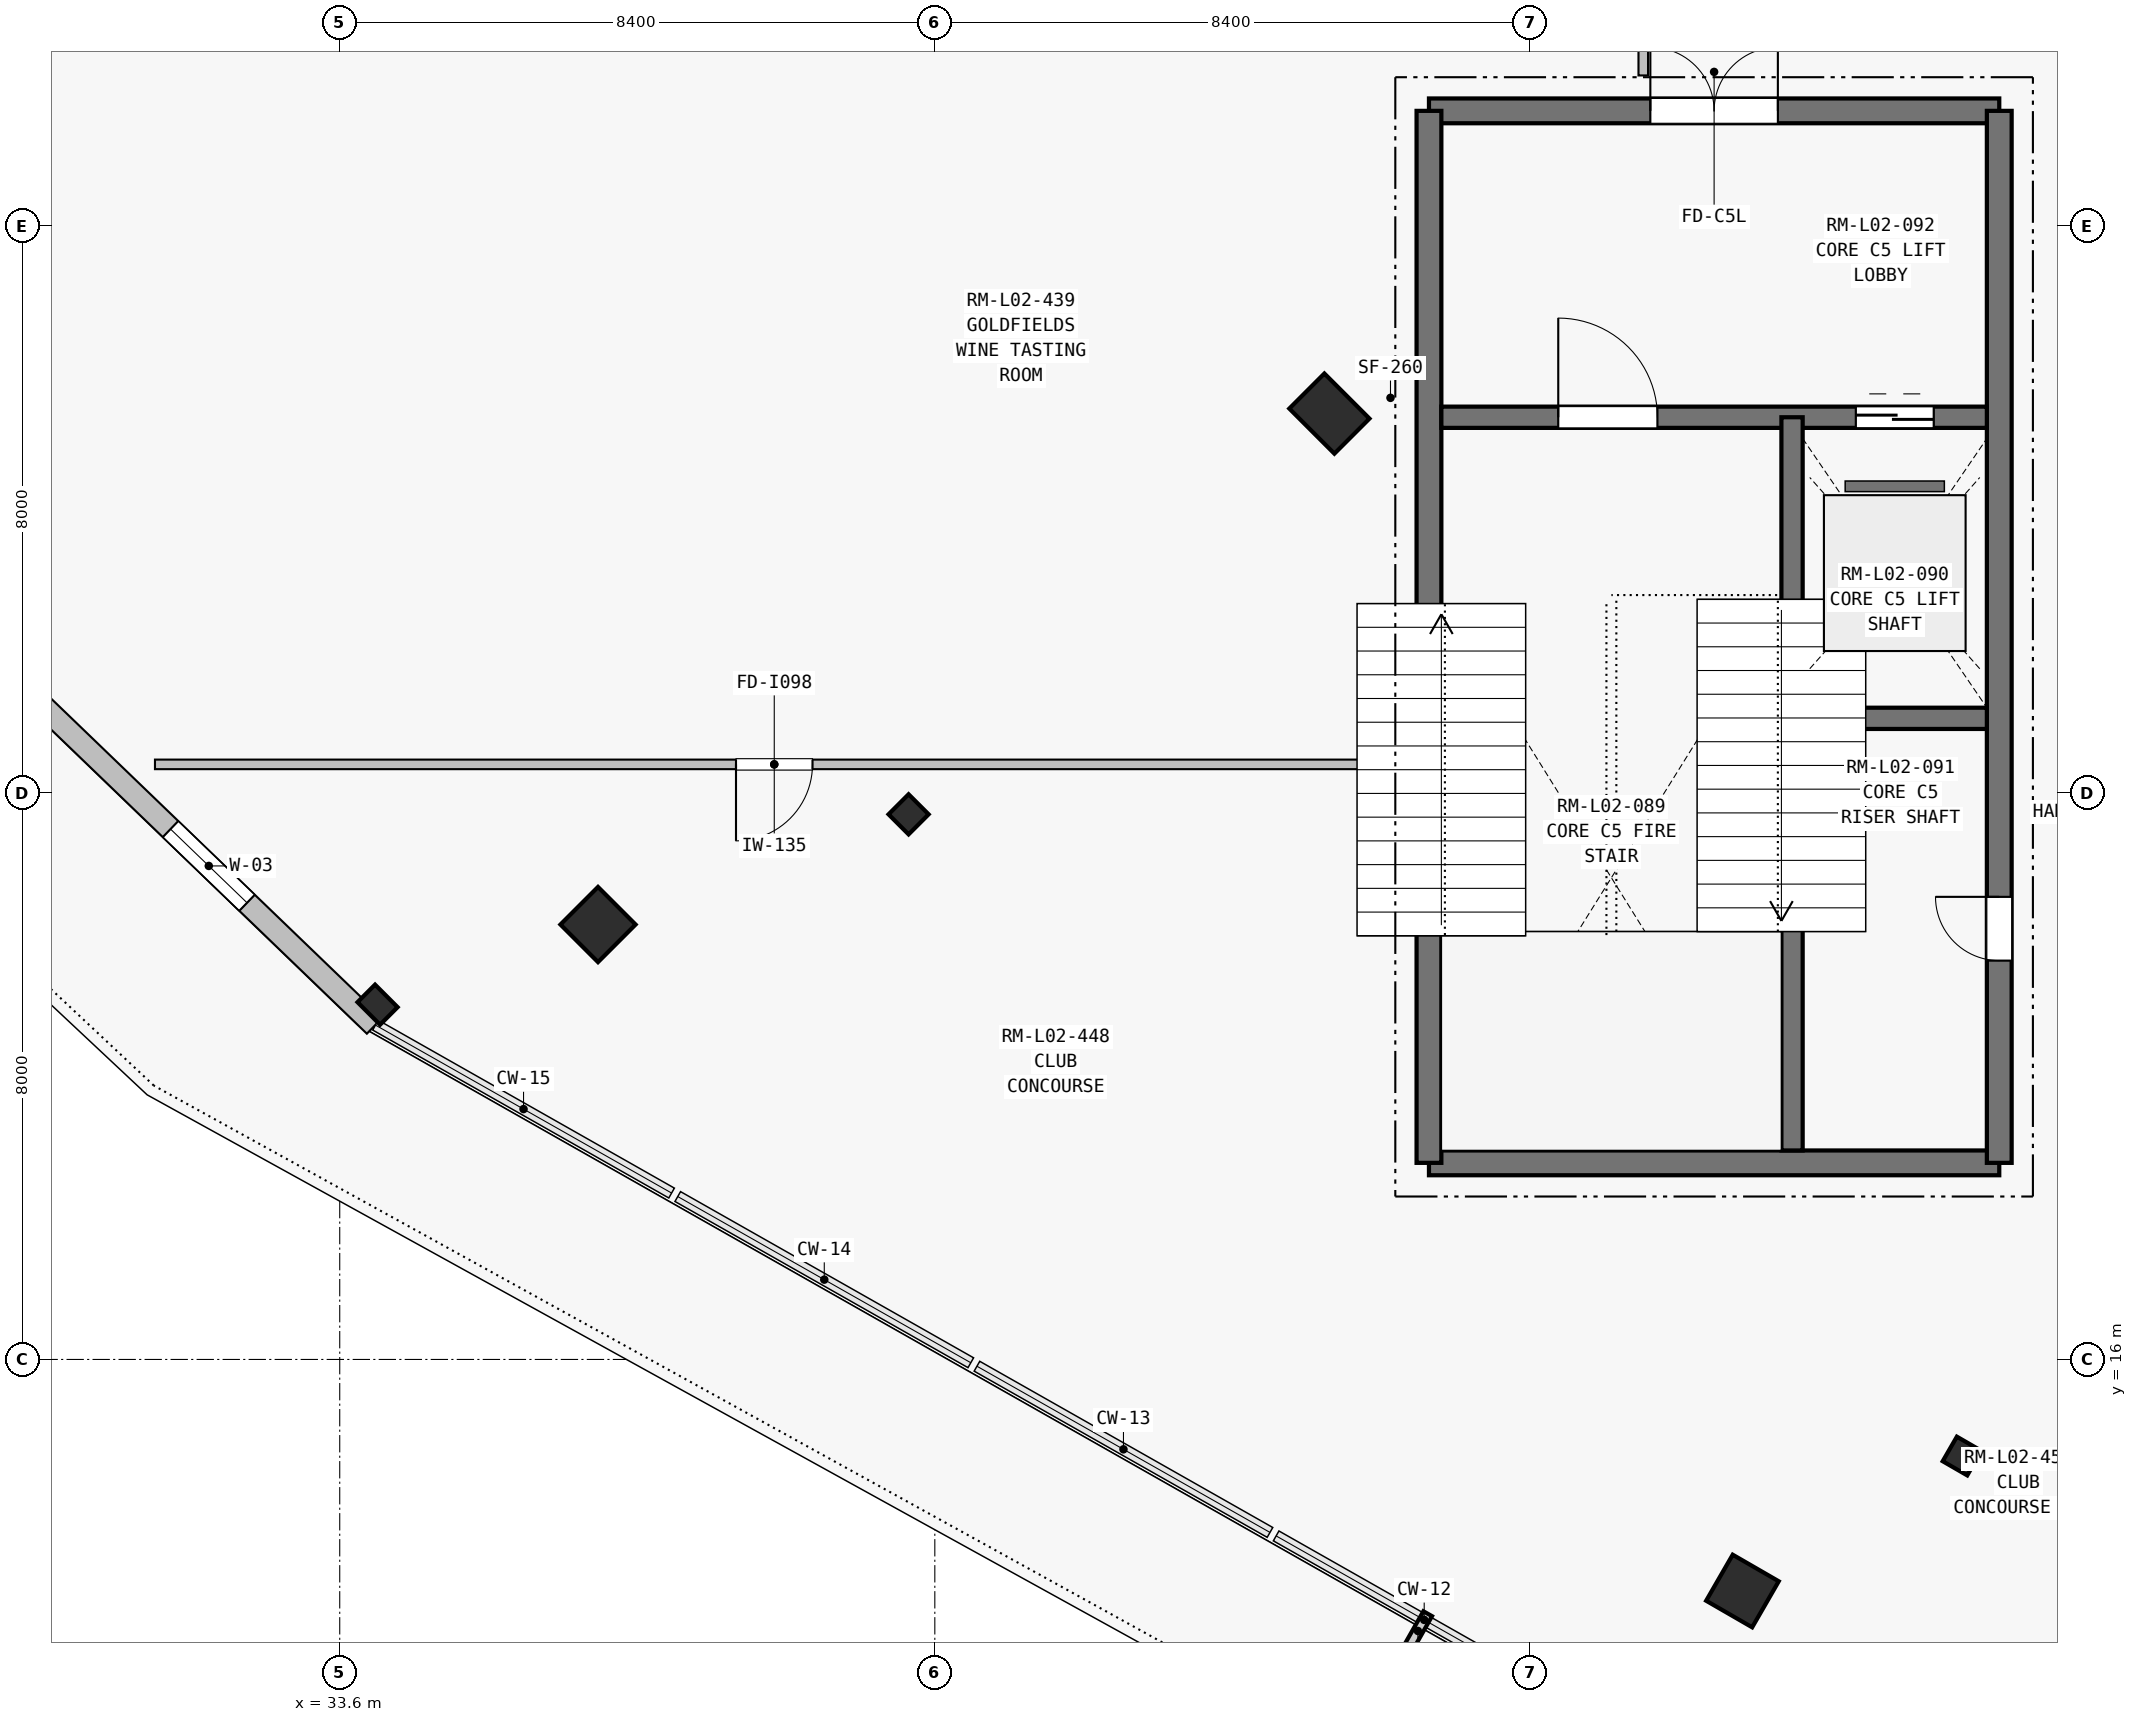
"""IFC4 building model, lengths in metres.
Left out: names, types, materials, properties, quantities, classifications, styles, units other than length and angle.
Written with IfcOpenShell. Run it as: python <this file> out.ifc"""

import sys

from ifc_helpers import new_model, si_unit, direction, frame, frame_2d, origin, origin_2d, place, context, subcontext, project, spatial, rectangle, i_section, extrude, element, fill, save


model = new_model("IFC4")
c1 = context("Model", 3, precision=1e-05, world=origin(), true_north=direction((0.0, 1.0)))
c2 = subcontext(c1, "Body", "Model", "MODEL_VIEW")
j1 = project(units=[si_unit("LENGTHUNIT", "METRE"), si_unit("PLANEANGLEUNIT", "RADIAN")], contexts=[c1])
p1 = place(None, origin())
s1 = spatial("IfcSite", under=j1, at=p1, CompositionType="ELEMENT")
p2 = place(p1, origin())
s2 = spatial("IfcBuilding", under=s1, at=p2, CompositionType="ELEMENT")
p3 = place(p2, frame((0.0, 0.0, 9.9)))
s3 = spatial("IfcBuildingStorey", under=s2, at=p3, CompositionType="ELEMENT", Elevation=9.9)
p4 = place(p3, frame((47.569, 29.352, 0.0), z_axis=(0.0, 0.0, 1.0), x_axis=(-0.707106781187, -0.707106781187, 0.0)))
e1 = element("IfcColumn", 1, at=p4, inside=s3, PredefinedType="COLUMN", context=c2, shape_type="SweptSolid", body=[
    extrude(rectangle(XDim=0.7, YDim=0.9, at=origin_2d()), origin(), (0.0, 0.0, 1.0), 4.5),
])
for number, where, z_axis, x_axis in (
    (2, (41.63, 23.695, 0.0), (0.0, 0.0, 1.0), (-0.707, -0.707, 0.0)),
    (3, (56.5, 14.637, 0.0), (0.0, 0.0, 1.0), (-0.5, -0.866, 0.0)),
):
    element("IfcColumn", number, at=place(p3, frame(where, z_axis=z_axis, x_axis=x_axis)), inside=s3, PredefinedType="COLUMN", context=c2, shape_type="SweptSolid", body=[
        extrude(i_section(OverallWidth=0.4, OverallDepth=0.4, WebThickness=0.016, FlangeThickness=0.028, at=origin_2d()), origin(), (0.0, 0.0, 1.0), 4.5),
    ])
for number, where, z_axis, x_axis in (
    (4, (37.246, 22.139, 0.0), (0.0, 0.0, 1.0), (-0.707, -0.707, 0.0)),
    (5, (53.4, 12.731, 0.0), (0.0, 0.0, 1.0), (-0.5, -0.866, 0.0)),
):
    element("IfcColumn", number, at=place(p3, frame(where, z_axis=z_axis, x_axis=x_axis)), inside=s3, PredefinedType="COLUMN", context=c2, shape_type="SweptSolid", body=[
        extrude(rectangle(XDim=0.75, YDim=0.75, at=origin_2d()), origin(), (0.0, 0.0, 1.0), 4.5),
    ])
p5 = place(p3, frame((34.134, 21.008, 0.0), z_axis=(0.0, 0.0, 1.0), x_axis=(-0.707106781187, -0.707106781187, 0.0)))
e6 = element("IfcColumn", 6, at=p5, inside=s3, PredefinedType="PILASTER", context=c2, shape_type="SweptSolid", body=[
    extrude(rectangle(XDim=0.35, YDim=0.45, at=origin_2d()), origin(), (0.0, 0.0, 1.0), 5.45),
])
p6 = place(p3, frame((34.092, 20.712, 0.0), z_axis=(0.0, 0.0, 1.0), x_axis=(-0.720214986834, 0.693750944316, 0.0)))
e7 = element("IfcWall", 7, at=p6, inside=s3, PredefinedType="SOLIDWALL", context=c2, shape_type="SweptSolid", body=[
    extrude(rectangle(XDim=18.635, YDim=0.315, at=frame_2d((9.318, 0.0))), origin(), (0.0, 0.0, 1.0), 4.265),
])
p7 = place(p6, frame((2.5, 0.0, 0.75)))
e8 = element("IfcOpeningElement", 8, at=p7, cuts=e7, PredefinedType="OPENING", context=c2, shape_type="SweptSolid", body=[
    extrude(rectangle(XDim=1.5, YDim=2.3, at=frame_2d((0.75, 1.15))), frame((0.0, 0.167, 0.0), z_axis=(0.0, -1.0, 0.0), x_axis=(1.0, 0.0, 0.0)), (0.0, 0.0, 1.0), 0.335),
])
p8 = place(p6, frame((7.25, 0.0, 0.75)))
e9 = element("IfcOpeningElement", 9, at=p8, cuts=e7, PredefinedType="OPENING", context=c2, shape_type="SweptSolid", body=[
    extrude(rectangle(XDim=1.2, YDim=2.2, at=frame_2d((0.6, 1.1))), frame((0.0, 0.167, 0.0), z_axis=(0.0, -1.0, 0.0), x_axis=(1.0, 0.0, 0.0)), (0.0, 0.0, 1.0), 0.335),
])
p9 = place(p3, frame((48.975, 18.775, 0.0), z_axis=(0.0, 0.0, 1.0), x_axis=(1.0, 0.0, 0.0)))
e10 = element("IfcWall", 10, at=p9, inside=s3, PredefinedType="SHEAR", context=c2, shape_type="SweptSolid", body=[
    extrude(rectangle(XDim=8.05, YDim=0.35, at=frame_2d((4.025, 0.0))), origin(), (0.0, 0.0, 1.0), 4.5),
])
p10 = place(p3, frame((48.975, 33.625, 0.0), z_axis=(0.0, 0.0, 1.0), x_axis=(1.0, 0.0, 0.0)))
e11 = element("IfcWall", 11, at=p10, inside=s3, PredefinedType="SHEAR", context=c2, shape_type="SweptSolid", body=[
    extrude(rectangle(XDim=8.05, YDim=0.35, at=frame_2d((4.025, 0.0))), origin(), (0.0, 0.0, 1.0), 4.5),
])
p11 = place(p10, frame((3.125, 0.0, 0.0)))
e12 = element("IfcOpeningElement", 12, at=p11, cuts=e11, PredefinedType="OPENING", context=c2, shape_type="SweptSolid", body=[
    extrude(rectangle(XDim=1.8, YDim=2.25, at=frame_2d((0.9, 1.125))), frame((0.0, 0.185, 0.0), z_axis=(0.0, -1.0, 0.0), x_axis=(1.0, 0.0, 0.0)), (0.0, 0.0, 1.0), 0.37),
])
p12 = place(p3, frame((48.975, 18.775, 0.0), z_axis=(0.0, 0.0, 1.0), x_axis=(0.0, 1.0, 0.0)))
e13 = element("IfcWall", 13, at=p12, inside=s3, PredefinedType="SHEAR", context=c2, shape_type="SweptSolid", body=[
    extrude(rectangle(XDim=14.85, YDim=0.35, at=frame_2d((7.425, 0.0))), origin(), (0.0, 0.0, 1.0), 4.5),
])
p13 = place(p3, frame((57.025, 18.775, 0.0), z_axis=(0.0, 0.0, 1.0), x_axis=(0.0, 1.0, 0.0)))
e14 = element("IfcWall", 14, at=p13, inside=s3, PredefinedType="SHEAR", context=c2, shape_type="SweptSolid", body=[
    extrude(rectangle(XDim=14.85, YDim=0.35, at=frame_2d((7.425, 0.0))), origin(), (0.0, 0.0, 1.0), 4.5),
])
p14 = place(p13, frame((2.855, 0.0, 0.0)))
e15 = element("IfcOpeningElement", 15, at=p14, cuts=e14, PredefinedType="OPENING", context=c2, shape_type="SweptSolid", body=[
    extrude(rectangle(XDim=0.9, YDim=2.1, at=frame_2d((0.45, 1.05))), frame((0.0, 0.185, 0.0), z_axis=(0.0, -1.0, 0.0), x_axis=(1.0, 0.0, 0.0)), (0.0, 0.0, 1.0), 0.37),
])
p15 = place(p3, frame((49.15, 29.3, 0.0), z_axis=(0.0, 0.0, 1.0), x_axis=(1.0, 0.0, 0.0)))
e16 = element("IfcWall", 16, at=p15, inside=s3, PredefinedType="SHEAR", context=c2, shape_type="SweptSolid", body=[
    extrude(rectangle(XDim=7.7, YDim=0.3, at=frame_2d((3.85, 0.0))), origin(), (0.0, 0.0, 1.0), 4.5),
])
p16 = place(p15, frame((1.65, 0.0, 0.0)))
e17 = element("IfcOpeningElement", 17, at=p16, cuts=e16, PredefinedType="OPENING", context=c2, shape_type="SweptSolid", body=[
    extrude(rectangle(XDim=1.4, YDim=2.2, at=frame_2d((0.7, 1.1))), frame((0.0, 0.16, 0.0), z_axis=(0.0, -1.0, 0.0), x_axis=(1.0, 0.0, 0.0)), (0.0, 0.0, 1.0), 0.32),
])
p17 = place(p15, frame((5.85, 0.0, 0.0)))
e18 = element("IfcOpeningElement", 18, at=p17, cuts=e16, PredefinedType="OPENING", context=c2, shape_type="SweptSolid", body=[
    extrude(rectangle(XDim=1.1, YDim=2.2, at=frame_2d((0.55, 1.1))), frame((0.0, 0.16, 0.0), z_axis=(0.0, -1.0, 0.0), x_axis=(1.0, 0.0, 0.0)), (0.0, 0.0, 1.0), 0.32),
])
p18 = place(p3, frame((54.1, 18.95, 0.0), z_axis=(0.0, 0.0, 1.0), x_axis=(0.0, 1.0, 0.0)))
e19 = element("IfcWall", 19, at=p18, inside=s3, PredefinedType="SHEAR", context=c2, shape_type="SweptSolid", body=[
    extrude(rectangle(XDim=10.35, YDim=0.3, at=frame_2d((5.175, 0.0))), origin(), (0.0, 0.0, 1.0), 4.5),
])
p19 = place(p3, frame((54.25, 25.05, 0.0), z_axis=(0.0, 0.0, 1.0), x_axis=(1.0, 0.0, 0.0)))
e20 = element("IfcWall", 20, at=p19, inside=s3, PredefinedType="SHEAR", context=c2, shape_type="SweptSolid", body=[
    extrude(rectangle(XDim=2.6, YDim=0.3, at=frame_2d((1.3, 0.0))), origin(), (0.0, 0.0, 1.0), 4.5),
])
p20 = place(p3, frame((52.0, 41.715, 0.0), z_axis=(0.0, 0.0, 1.0), x_axis=(0.0, -1.0, 0.0)))
e21 = element("IfcWall", 21, at=p20, inside=s3, PredefinedType="PARTITIONING", context=c2, shape_type="SweptSolid", body=[
    extrude(rectangle(XDim=7.59, YDim=0.135, at=frame_2d((3.795, 0.0))), origin(), (0.0, 0.0, 1.0), 2.323),
])
p21 = place(p3, frame((48.475, 24.4, 0.0), z_axis=(0.0, 0.0, 1.0), x_axis=(-1.0, 0.0, 0.0)))
e22 = element("IfcWall", 22, at=p21, inside=s3, PredefinedType="PARTITIONING", context=c2, shape_type="SweptSolid", body=[
    extrude(rectangle(XDim=17.483, YDim=0.135, at=frame_2d((8.741, 0.0))), origin(), (0.0, 0.0, 1.0), 3.285),
])
p22 = place(p21, frame((8.201, 0.0, 0.0)))
e23 = element("IfcOpeningElement", 23, at=p22, cuts=e22, PredefinedType="OPENING", context=c2, shape_type="SweptSolid", body=[
    extrude(rectangle(XDim=1.08, YDim=2.15, at=frame_2d((0.54, 1.075))), frame((0.0, 0.077, 0.0), z_axis=(0.0, -1.0, 0.0), x_axis=(1.0, 0.0, 0.0)), (0.0, 0.0, 1.0), 0.155),
])
p23 = place(p7, origin())
e24 = element("IfcWindow", 24, at=p23, inside=s3, PartitioningType="SINGLE_PANEL", PredefinedType="WINDOW", context=c2, shape_type="SweptSolid", body=[
    extrude(rectangle(XDim=1.5, YDim=2.3, at=frame_2d((0.75, 1.15))), frame((0.0, 0.03, 0.0), z_axis=(0.0, -1.0, 0.0), x_axis=(1.0, 0.0, 0.0)), (0.0, 0.0, 1.0), 0.06),
])
fill(e8, e24)
p24 = place(p11, origin())
e25 = element("IfcDoor", 25, at=p24, inside=s3, OperationType="DOUBLE_DOOR_SINGLE_SWING", PredefinedType="DOOR", context=c2, shape_type="SweptSolid", body=[
    extrude(rectangle(XDim=1.8, YDim=2.25, at=frame_2d((0.9, 1.125))), frame((0.0, 0.025, 0.0), z_axis=(0.0, -1.0, 0.0), x_axis=(1.0, 0.0, 0.0)), (0.0, 0.0, 1.0), 0.05),
])
fill(e12, e25)
p25 = place(p16, origin())
e26 = element("IfcDoor", 26, at=p25, inside=s3, OperationType="SINGLE_SWING_LEFT", PredefinedType="DOOR", context=c2, shape_type="SweptSolid", body=[
    extrude(rectangle(XDim=1.4, YDim=2.2, at=frame_2d((0.7, 1.1))), frame((0.0, 0.025, 0.0), z_axis=(0.0, -1.0, 0.0), x_axis=(1.0, 0.0, 0.0)), (0.0, 0.0, 1.0), 0.05),
])
fill(e17, e26)
p26 = place(p14, origin())
e27 = element("IfcDoor", 27, at=p26, inside=s3, OperationType="SINGLE_SWING_RIGHT", PredefinedType="DOOR", context=c2, shape_type="SweptSolid", body=[
    extrude(rectangle(XDim=0.9, YDim=2.1, at=frame_2d((0.45, 1.05))), frame((0.0, 0.025, 0.0), z_axis=(0.0, -1.0, 0.0), x_axis=(1.0, 0.0, 0.0)), (0.0, 0.0, 1.0), 0.05),
])
fill(e15, e27)
p27 = place(p17, origin())
e28 = element("IfcDoor", 28, at=p27, inside=s3, OperationType="SLIDING_TO_LEFT", PredefinedType="DOOR", context=c2, shape_type="SweptSolid", body=[
    extrude(rectangle(XDim=1.1, YDim=2.2, at=frame_2d((0.55, 1.1))), frame((0.0, 0.025, 0.0), z_axis=(0.0, -1.0, 0.0), x_axis=(1.0, 0.0, 0.0)), (0.0, 0.0, 1.0), 0.05),
])
fill(e18, e28)
p28 = place(p22, origin())
e29 = element("IfcDoor", 29, at=p28, inside=s3, OperationType="SINGLE_SWING_RIGHT", PredefinedType="DOOR", context=c2, shape_type="SweptSolid", body=[
    extrude(rectangle(XDim=1.08, YDim=2.15, at=frame_2d((0.54, 1.075))), frame((0.0, 0.025, 0.0), z_axis=(0.0, -1.0, 0.0), x_axis=(1.0, 0.0, 0.0)), (0.0, 0.0, 1.0), 0.05),
])
fill(e23, e29)
save(model, sys.argv[1])
